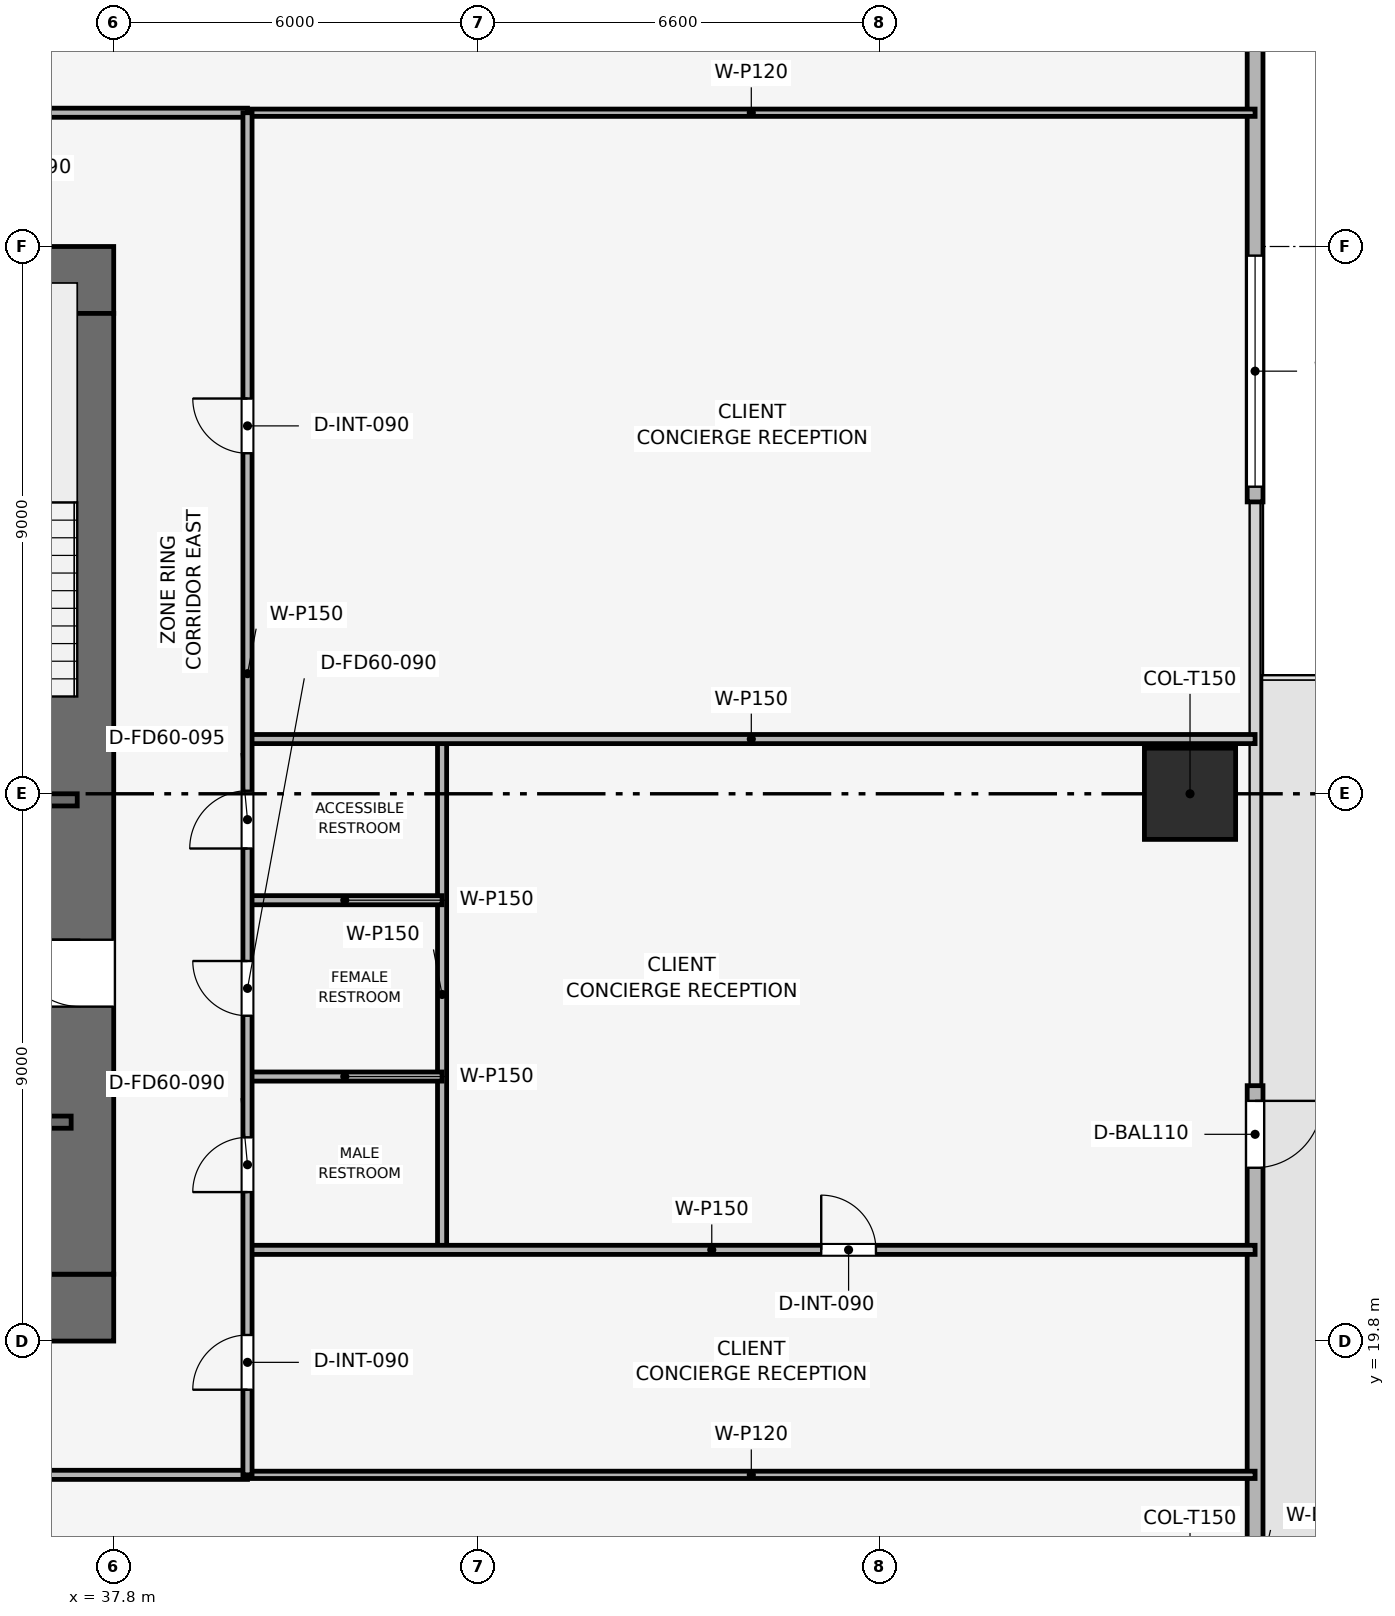
"""IFC4 building model, lengths in metres.
Left out: names, types, materials, properties, quantities, classifications, styles, units other than length and angle.
Written with IfcOpenShell. Run it as: python <this file> out.ifc"""

import sys

from ifc_helpers import new_model, si_unit, direction, frame, frame_2d, origin, origin_2d, place, context, subcontext, project, spatial, rectangle, extrude, element, fill, save


model = new_model("IFC4")
c1 = context("Model", 3, precision=1e-05, world=origin(), true_north=direction((0.0, 1.0)))
c2 = subcontext(c1, "Body", "Model", "MODEL_VIEW")
j1 = project(units=[si_unit("LENGTHUNIT", "METRE"), si_unit("PLANEANGLEUNIT", "RADIAN")], contexts=[c1])
p1 = place(None, origin())
s1 = spatial("IfcSite", under=j1, at=p1, CompositionType="ELEMENT")
p2 = place(p1, origin())
s2 = spatial("IfcBuilding", under=s1, at=p2, CompositionType="ELEMENT")
p3 = place(p2, frame((0.0, 0.0, 100.2)))
s3 = spatial("IfcBuildingStorey", under=s2, at=p3, CompositionType="ELEMENT", Elevation=100.2)
p4 = place(p3, frame((19.8, 20.35, 0.0), z_axis=(0.0, 0.0, 1.0), x_axis=(1.0, 0.0, 0.0)))
e1 = element("IfcWall", 1, at=p4, inside=s3, PredefinedType="SHEAR", context=c2, shape_type="SweptSolid", body=[
    extrude(rectangle(XDim=18.0, YDim=1.1, at=frame_2d((9.0, 0.0))), origin(), (0.0, 0.0, 1.0), 3.9),
])
p5 = place(p4, frame((8.4, 0.0, 0.0)))
e2 = element("IfcOpeningElement", 2, at=p5, cuts=e1, PredefinedType="OPENING", context=c2, shape_type="SweptSolid", body=[
    extrude(rectangle(XDim=1.2, YDim=2.2, at=frame_2d((0.6, 1.1))), frame((0.0, 0.56, 0.0), z_axis=(0.0, -1.0, 0.0), x_axis=(1.0, 0.0, 0.0)), (0.0, 0.0, 1.0), 1.12),
])
p6 = place(p3, frame((19.8, 37.25, 0.0), z_axis=(0.0, 0.0, 1.0), x_axis=(1.0, 0.0, 0.0)))
e3 = element("IfcWall", 3, at=p6, inside=s3, PredefinedType="SHEAR", context=c2, shape_type="SweptSolid", body=[
    extrude(rectangle(XDim=18.0, YDim=1.1, at=frame_2d((9.0, 0.0))), origin(), (0.0, 0.0, 1.0), 3.9),
])
p7 = place(p6, frame((7.05, 0.0, 0.0)))
e4 = element("IfcOpeningElement", 4, at=p7, cuts=e3, PredefinedType="OPENING", context=c2, shape_type="SweptSolid", body=[
    extrude(rectangle(XDim=1.1, YDim=2.15, at=frame_2d((0.55, 1.075))), frame((0.0, 0.56, 0.0), z_axis=(0.0, -1.0, 0.0), x_axis=(1.0, 0.0, 0.0)), (0.0, 0.0, 1.0), 1.12),
])
p8 = place(p3, frame((37.25, 20.9, 0.0), z_axis=(0.0, 0.0, 1.0), x_axis=(0.0, 1.0, 0.0)))
e5 = element("IfcWall", 5, at=p8, inside=s3, PredefinedType="SHEAR", context=c2, shape_type="SweptSolid", body=[
    extrude(rectangle(XDim=15.8, YDim=1.1, at=frame_2d((7.9, 0.0))), origin(), (0.0, 0.0, 1.0), 3.9),
])
p9 = place(p8, frame((4.4, 0.0, 0.0)))
e6 = element("IfcOpeningElement", 6, at=p9, cuts=e5, PredefinedType="OPENING", context=c2, shape_type="SweptSolid", body=[
    extrude(rectangle(XDim=1.1, YDim=2.15, at=frame_2d((0.55, 1.075))), frame((0.0, 0.56, 0.0), z_axis=(0.0, -1.0, 0.0), x_axis=(1.0, 0.0, 0.0)), (0.0, 0.0, 1.0), 1.12),
])
p10 = place(p3, frame((55.5, 28.8, 0.003), z_axis=(0.0, 0.0, 1.0), x_axis=(1.0, 0.0, 0.0)))
e7 = element("IfcColumn", 7, at=p10, inside=s3, PredefinedType="COLUMN", context=c2, shape_type="SweptSolid", body=[
    extrude(rectangle(XDim=1.5, YDim=1.5, at=origin_2d()), origin(), (0.0, 0.0, 1.0), 3.644),
])
p11 = place(p3, frame((56.57, 48.9, 0.0), z_axis=(0.0, 0.0, 1.0), x_axis=(0.0, -1.0, 0.0)))
e8 = element("IfcWall", 8, at=p11, inside=s3, PredefinedType="SOLIDWALL", context=c2, shape_type="SweptSolid", body=[
    extrude(rectangle(XDim=15.3, YDim=0.26, at=frame_2d((7.65, 0.0))), origin(), (0.0, 0.0, 1.0), 3.65),
])
p12 = place(p11, frame((11.25, 0.0, 0.9)))
e9 = element("IfcOpeningElement", 9, at=p12, cuts=e8, PredefinedType="OPENING", context=c2, shape_type="SweptSolid", body=[
    extrude(rectangle(XDim=3.8, YDim=1.9, at=frame_2d((1.9, 0.95))), frame((0.0, 0.14, 0.0), z_axis=(0.0, -1.0, 0.0), x_axis=(1.0, 0.0, 0.0)), (0.0, 0.0, 1.0), 0.28),
])
p13 = place(p3, frame((56.57, 24.0, 0.0), z_axis=(0.0, 0.0, 1.0), x_axis=(0.0, -1.0, 0.0)))
e10 = element("IfcWall", 10, at=p13, inside=s3, PredefinedType="SOLIDWALL", context=c2, shape_type="SweptSolid", body=[
    extrude(rectangle(XDim=15.3, YDim=0.26, at=frame_2d((7.65, 0.0))), origin(), (0.0, 0.0, 1.0), 3.65),
])
p14 = place(p13, frame((0.25, 0.0, 0.0)))
e11 = element("IfcOpeningElement", 11, at=p14, cuts=e10, PredefinedType="OPENING", context=c2, shape_type="SweptSolid", body=[
    extrude(rectangle(XDim=1.1, YDim=2.2, at=frame_2d((0.55, 1.1))), frame((0.0, 0.14, 0.0), z_axis=(0.0, -1.0, 0.0), x_axis=(1.0, 0.0, 0.0)), (0.0, 0.0, 1.0), 0.28),
])
p15 = place(p3, frame((34.05, 28.7, 0.0), z_axis=(0.0, 0.0, 1.0), x_axis=(1.0, 0.0, 0.0)))
e12 = element("IfcWall", 12, at=p15, inside=s3, PredefinedType="SHEAR", context=c2, shape_type="SweptSolid", body=[
    extrude(rectangle(XDim=3.15, YDim=0.2, at=frame_2d((1.575, 0.0))), origin(), (0.0, 0.0, 1.0), 3.65),
])
p16 = place(p15, frame((0.8, 0.0, 0.0)))
e13 = element("IfcOpeningElement", 13, at=p16, cuts=e12, PredefinedType="OPENING", context=c2, shape_type="SweptSolid", body=[
    extrude(rectangle(XDim=1.0, YDim=2.1, at=frame_2d((0.5, 1.05))), frame((0.0, 0.11, 0.0), z_axis=(0.0, -1.0, 0.0), x_axis=(1.0, 0.0, 0.0)), (0.0, 0.0, 1.0), 0.22),
])
p17 = place(p3, frame((34.05, 23.4, 0.0), z_axis=(0.0, 0.0, 1.0), x_axis=(1.0, 0.0, 0.0)))
e14 = element("IfcWall", 14, at=p17, inside=s3, PredefinedType="SHEAR", context=c2, shape_type="SweptSolid", body=[
    extrude(rectangle(XDim=3.05, YDim=0.2, at=frame_2d((1.525, 0.0))), origin(), (0.0, 0.0, 1.0), 3.65),
])
p18 = place(p17, frame((1.2, 0.0, 0.0)))
e15 = element("IfcOpeningElement", 15, at=p18, cuts=e14, PredefinedType="OPENING", context=c2, shape_type="SweptSolid", body=[
    extrude(rectangle(XDim=1.1, YDim=2.15, at=frame_2d((0.55, 1.075))), frame((0.0, 0.11, 0.0), z_axis=(0.0, -1.0, 0.0), x_axis=(1.0, 0.0, 0.0)), (0.0, 0.0, 1.0), 0.22),
])
for number, where, z_axis, x_axis in (
    (16, (40.0, 17.6, 0.0), (0.0, 0.0, 1.0), (1.0, 0.0, 0.0)),
    (17, (40.0, 40.0, 0.0), (0.0, 0.0, 1.0), (1.0, 0.0, 0.0)),
):
    element("IfcWall", number, at=place(p3, frame(where, z_axis=z_axis, x_axis=x_axis)), inside=s3, PredefinedType="PARTITIONING", context=c2, shape_type="SweptSolid", body=[
        extrude(rectangle(XDim=16.57, YDim=0.12, at=frame_2d((8.285, 0.0))), origin(), (0.0, 0.0, 1.0), 2.935),
    ])
p19 = place(p3, frame((43.2, 21.3, 0.0), z_axis=(0.0, 0.0, 1.0), x_axis=(0.0, 1.0, 0.0)))
e18 = element("IfcWall", 18, at=p19, inside=s3, PredefinedType="PARTITIONING", context=c2, shape_type="SweptSolid", body=[
    extrude(rectangle(XDim=8.4, YDim=0.15, at=frame_2d((4.2, 0.0))), origin(), (0.0, 0.0, 1.0), 3.085),
])
p20 = place(p3, frame((40.0, 21.3, 0.0), z_axis=(0.0, 0.0, 1.0), x_axis=(1.0, 0.0, 0.0)))
e19 = element("IfcWall", 19, at=p20, inside=s3, PredefinedType="PARTITIONING", context=c2, shape_type="SweptSolid", body=[
    extrude(rectangle(XDim=16.57, YDim=0.15, at=frame_2d((8.285, 0.0))), origin(), (0.0, 0.0, 1.0), 2.935),
])
p21 = place(p20, frame((9.435, 0.0, 0.0)))
e20 = element("IfcOpeningElement", 20, at=p21, cuts=e19, PredefinedType="OPENING", context=c2, shape_type="SweptSolid", body=[
    extrude(rectangle(XDim=0.9, YDim=2.1, at=frame_2d((0.45, 1.05))), frame((0.0, 0.085, 0.0), z_axis=(0.0, -1.0, 0.0), x_axis=(1.0, 0.0, 0.0)), (0.0, 0.0, 1.0), 0.17),
])
p22 = place(p3, frame((40.0, 29.7, 0.0), z_axis=(0.0, 0.0, 1.0), x_axis=(1.0, 0.0, 0.0)))
e21 = element("IfcWall", 21, at=p22, inside=s3, PredefinedType="PARTITIONING", context=c2, shape_type="SweptSolid", body=[
    extrude(rectangle(XDim=16.57, YDim=0.15, at=frame_2d((8.285, 0.0))), origin(), (0.0, 0.0, 1.0), 2.935),
])
for number, where, z_axis, x_axis in (
    (22, (40.0, 24.15, 0.0), (0.0, 0.0, 1.0), (1.0, 0.0, 0.0)),
    (23, (40.0, 27.05, 0.0), (0.0, 0.0, 1.0), (1.0, 0.0, 0.0)),
):
    element("IfcWall", number, at=place(p3, frame(where, z_axis=z_axis, x_axis=x_axis)), inside=s3, PredefinedType="PARTITIONING", context=c2, shape_type="SweptSolid", body=[
        extrude(rectangle(XDim=3.2, YDim=0.15, at=frame_2d((1.6, 0.0))), origin(), (0.0, 0.0, 1.0), 3.65),
    ])
p23 = place(p3, frame((17.6, 17.6, 0.0), z_axis=(0.0, 0.0, 1.0), x_axis=(1.0, 0.0, 0.0)))
e24 = element("IfcWall", 24, at=p23, inside=s3, PredefinedType="PARTITIONING", context=c2, shape_type="SweptSolid", body=[
    extrude(rectangle(XDim=22.4, YDim=0.15, at=frame_2d((11.2, 0.0))), origin(), (0.0, 0.0, 1.0), 3.085),
])
p24 = place(p23, frame((10.75, 0.0, 0.0)))
e25 = element("IfcOpeningElement", 25, at=p24, cuts=e24, PredefinedType="OPENING", context=c2, shape_type="SweptSolid", body=[
    extrude(rectangle(XDim=0.9, YDim=2.1, at=frame_2d((0.45, 1.05))), frame((0.0, 0.085, 0.0), z_axis=(0.0, -1.0, 0.0), x_axis=(1.0, 0.0, 0.0)), (0.0, 0.0, 1.0), 0.17),
])
p25 = place(p3, frame((17.6, 40.0, 0.0), z_axis=(0.0, 0.0, 1.0), x_axis=(1.0, 0.0, 0.0)))
e26 = element("IfcWall", 26, at=p25, inside=s3, PredefinedType="PARTITIONING", context=c2, shape_type="SweptSolid", body=[
    extrude(rectangle(XDim=22.4, YDim=0.15, at=frame_2d((11.2, 0.0))), origin(), (0.0, 0.0, 1.0), 3.085),
])
p26 = place(p25, frame((0.7, 0.0, 0.0)))
e27 = element("IfcOpeningElement", 27, at=p26, cuts=e26, PredefinedType="OPENING", context=c2, shape_type="SweptSolid", body=[
    extrude(rectangle(XDim=0.9, YDim=2.1, at=frame_2d((0.45, 1.05))), frame((0.0, 0.085, 0.0), z_axis=(0.0, -1.0, 0.0), x_axis=(1.0, 0.0, 0.0)), (0.0, 0.0, 1.0), 0.17),
])
p27 = place(p25, frame((4.706, 0.0, 0.0)))
e28 = element("IfcOpeningElement", 28, at=p27, cuts=e26, PredefinedType="OPENING", context=c2, shape_type="SweptSolid", body=[
    extrude(rectangle(XDim=0.9, YDim=2.1, at=frame_2d((0.45, 1.05))), frame((0.0, 0.085, 0.0), z_axis=(0.0, -1.0, 0.0), x_axis=(1.0, 0.0, 0.0)), (0.0, 0.0, 1.0), 0.17),
])
p28 = place(p25, frame((10.704, 0.0, 0.0)))
e29 = element("IfcOpeningElement", 29, at=p28, cuts=e26, PredefinedType="OPENING", context=c2, shape_type="SweptSolid", body=[
    extrude(rectangle(XDim=0.9, YDim=2.1, at=frame_2d((0.45, 1.05))), frame((0.0, 0.085, 0.0), z_axis=(0.0, -1.0, 0.0), x_axis=(1.0, 0.0, 0.0)), (0.0, 0.0, 1.0), 0.17),
])
p29 = place(p25, frame((17.898, 0.0, 0.0)))
e30 = element("IfcOpeningElement", 30, at=p29, cuts=e26, PredefinedType="OPENING", context=c2, shape_type="SweptSolid", body=[
    extrude(rectangle(XDim=0.9, YDim=2.1, at=frame_2d((0.45, 1.05))), frame((0.0, 0.085, 0.0), z_axis=(0.0, -1.0, 0.0), x_axis=(1.0, 0.0, 0.0)), (0.0, 0.0, 1.0), 0.17),
])
p30 = place(p3, frame((40.0, 17.6, 0.0), z_axis=(0.0, 0.0, 1.0), x_axis=(0.0, 1.0, 0.0)))
e31 = element("IfcWall", 31, at=p30, inside=s3, PredefinedType="PARTITIONING", context=c2, shape_type="SweptSolid", body=[
    extrude(rectangle(XDim=22.4, YDim=0.15, at=frame_2d((11.2, 0.0))), origin(), (0.0, 0.0, 1.0), 3.085),
])
p31 = place(p30, frame((1.4, 0.0, 0.0)))
e32 = element("IfcOpeningElement", 32, at=p31, cuts=e31, PredefinedType="OPENING", context=c2, shape_type="SweptSolid", body=[
    extrude(rectangle(XDim=0.9, YDim=2.1, at=frame_2d((0.45, 1.05))), frame((0.0, 0.085, 0.0), z_axis=(0.0, -1.0, 0.0), x_axis=(1.0, 0.0, 0.0)), (0.0, 0.0, 1.0), 0.17),
])
p32 = place(p30, frame((4.65, 0.0, 0.0)))
e33 = element("IfcOpeningElement", 33, at=p32, cuts=e31, PredefinedType="OPENING", context=c2, shape_type="SweptSolid", body=[
    extrude(rectangle(XDim=0.9, YDim=2.1, at=frame_2d((0.45, 1.05))), frame((0.0, 0.085, 0.0), z_axis=(0.0, -1.0, 0.0), x_axis=(1.0, 0.0, 0.0)), (0.0, 0.0, 1.0), 0.17),
])
p33 = place(p30, frame((7.55, 0.0, 0.0)))
e34 = element("IfcOpeningElement", 34, at=p33, cuts=e31, PredefinedType="OPENING", context=c2, shape_type="SweptSolid", body=[
    extrude(rectangle(XDim=0.9, YDim=2.1, at=frame_2d((0.45, 1.05))), frame((0.0, 0.085, 0.0), z_axis=(0.0, -1.0, 0.0), x_axis=(1.0, 0.0, 0.0)), (0.0, 0.0, 1.0), 0.17),
])
p34 = place(p30, frame((10.3, 0.0, 0.0)))
e35 = element("IfcOpeningElement", 35, at=p34, cuts=e31, PredefinedType="OPENING", context=c2, shape_type="SweptSolid", body=[
    extrude(rectangle(XDim=0.95, YDim=2.1, at=frame_2d((0.475, 1.05))), frame((0.0, 0.085, 0.0), z_axis=(0.0, -1.0, 0.0), x_axis=(1.0, 0.0, 0.0)), (0.0, 0.0, 1.0), 0.17),
])
p35 = place(p30, frame((16.8, 0.0, 0.0)))
e36 = element("IfcOpeningElement", 36, at=p35, cuts=e31, PredefinedType="OPENING", context=c2, shape_type="SweptSolid", body=[
    extrude(rectangle(XDim=0.9, YDim=2.1, at=frame_2d((0.45, 1.05))), frame((0.0, 0.085, 0.0), z_axis=(0.0, -1.0, 0.0), x_axis=(1.0, 0.0, 0.0)), (0.0, 0.0, 1.0), 0.17),
])
p36 = place(p14, origin())
e37 = element("IfcDoor", 37, at=p36, inside=s3, OperationType="SINGLE_SWING_LEFT", PredefinedType="DOOR", context=c2, shape_type="SweptSolid", body=[
    extrude(rectangle(XDim=1.1, YDim=2.2, at=frame_2d((0.55, 1.1))), frame((0.0, 0.025, 0.0), z_axis=(0.0, -1.0, 0.0), x_axis=(1.0, 0.0, 0.0)), (0.0, 0.0, 1.0), 0.05),
])
fill(e11, e37)
p37 = place(p12, origin())
e38 = element("IfcWindow", 38, at=p37, inside=s3, PartitioningType="SINGLE_PANEL", PredefinedType="WINDOW", context=c2, shape_type="SweptSolid", body=[
    extrude(rectangle(XDim=3.8, YDim=1.9, at=frame_2d((1.9, 0.95))), frame((0.0, 0.03, 0.0), z_axis=(0.0, -1.0, 0.0), x_axis=(1.0, 0.0, 0.0)), (0.0, 0.0, 1.0), 0.06),
])
fill(e9, e38)
p38 = place(p21, origin())
e39 = element("IfcDoor", 39, at=p38, inside=s3, OperationType="SINGLE_SWING_LEFT", PredefinedType="DOOR", context=c2, shape_type="SweptSolid", body=[
    extrude(rectangle(XDim=0.9, YDim=2.1, at=frame_2d((0.45, 1.05))), frame((0.0, 0.025, 0.0), z_axis=(0.0, -1.0, 0.0), x_axis=(1.0, 0.0, 0.0)), (0.0, 0.0, 1.0), 0.05),
])
fill(e20, e39)
p39 = place(p31, origin())
e40 = element("IfcDoor", 40, at=p39, inside=s3, OperationType="SINGLE_SWING_LEFT", PredefinedType="DOOR", context=c2, shape_type="SweptSolid", body=[
    extrude(rectangle(XDim=0.9, YDim=2.1, at=frame_2d((0.45, 1.05))), frame((0.0, 0.025, 0.0), z_axis=(0.0, -1.0, 0.0), x_axis=(1.0, 0.0, 0.0)), (0.0, 0.0, 1.0), 0.05),
])
fill(e32, e40)
p40 = place(p32, origin())
e41 = element("IfcDoor", 41, at=p40, inside=s3, OperationType="SINGLE_SWING_LEFT", PredefinedType="DOOR", context=c2, shape_type="SweptSolid", body=[
    extrude(rectangle(XDim=0.9, YDim=2.1, at=frame_2d((0.45, 1.05))), frame((0.0, 0.025, 0.0), z_axis=(0.0, -1.0, 0.0), x_axis=(1.0, 0.0, 0.0)), (0.0, 0.0, 1.0), 0.05),
])
fill(e33, e41)
p41 = place(p33, origin())
e42 = element("IfcDoor", 42, at=p41, inside=s3, OperationType="SINGLE_SWING_RIGHT", PredefinedType="DOOR", context=c2, shape_type="SweptSolid", body=[
    extrude(rectangle(XDim=0.9, YDim=2.1, at=frame_2d((0.45, 1.05))), frame((0.0, 0.025, 0.0), z_axis=(0.0, -1.0, 0.0), x_axis=(1.0, 0.0, 0.0)), (0.0, 0.0, 1.0), 0.05),
])
fill(e34, e42)
p42 = place(p34, origin())
e43 = element("IfcDoor", 43, at=p42, inside=s3, OperationType="SINGLE_SWING_LEFT", PredefinedType="DOOR", context=c2, shape_type="SweptSolid", body=[
    extrude(rectangle(XDim=0.95, YDim=2.1, at=frame_2d((0.475, 1.05))), frame((0.0, 0.025, 0.0), z_axis=(0.0, -1.0, 0.0), x_axis=(1.0, 0.0, 0.0)), (0.0, 0.0, 1.0), 0.05),
])
fill(e35, e43)
p43 = place(p35, origin())
e44 = element("IfcDoor", 44, at=p43, inside=s3, OperationType="SINGLE_SWING_RIGHT", PredefinedType="DOOR", context=c2, shape_type="SweptSolid", body=[
    extrude(rectangle(XDim=0.9, YDim=2.1, at=frame_2d((0.45, 1.05))), frame((0.0, 0.025, 0.0), z_axis=(0.0, -1.0, 0.0), x_axis=(1.0, 0.0, 0.0)), (0.0, 0.0, 1.0), 0.05),
])
fill(e36, e44)
p44 = place(p9, origin())
e45 = element("IfcDoor", 45, at=p44, inside=s3, OperationType="SINGLE_SWING_RIGHT", PredefinedType="DOOR", context=c2, shape_type="SweptSolid", body=[
    extrude(rectangle(XDim=1.1, YDim=2.15, at=frame_2d((0.55, 1.075))), frame((0.0, 0.025, 0.0), z_axis=(0.0, -1.0, 0.0), x_axis=(1.0, 0.0, 0.0)), (0.0, 0.0, 1.0), 0.05),
])
fill(e6, e45)
save(model, sys.argv[1])
